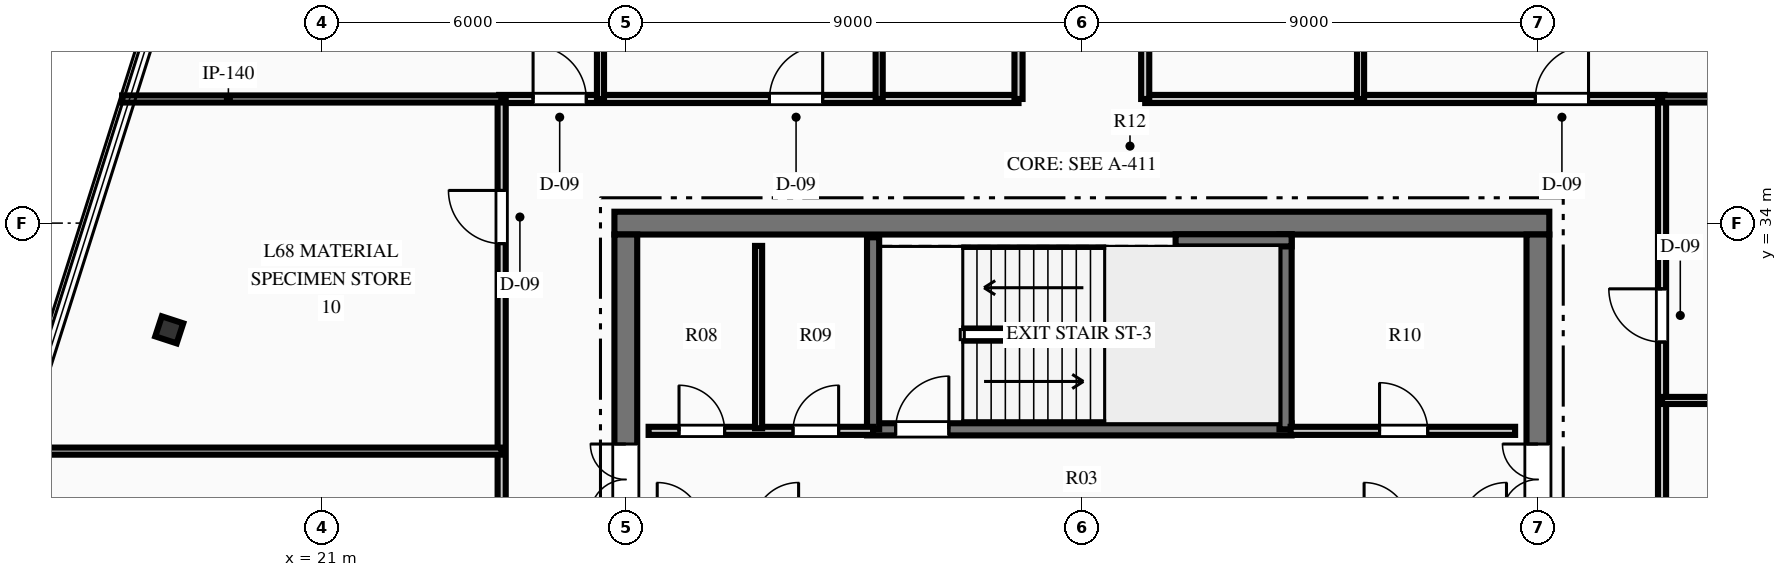
"""IFC4 building model, lengths in metres.
Left out: names, types, materials, properties, quantities, classifications, styles, units other than length and angle.
Written with IfcOpenShell. Run it as: python <this file> out.ifc"""

import sys

from ifc_helpers import new_model, si_unit, direction, frame, frame_2d, origin, origin_2d, place, context, subcontext, project, spatial, rectangle, i_section, extrude, element, fill, save


model = new_model("IFC4")
c1 = context("Model", 3, precision=1e-05, world=origin(), true_north=direction((0.0, 1.0)))
c2 = subcontext(c1, "Body", "Model", "MODEL_VIEW")
j1 = project(units=[si_unit("LENGTHUNIT", "METRE"), si_unit("PLANEANGLEUNIT", "RADIAN")], contexts=[c1])
p1 = place(None, origin())
s1 = spatial("IfcSite", under=j1, at=p1, CompositionType="ELEMENT")
p2 = place(p1, origin())
s2 = spatial("IfcBuilding", under=s1, at=p2, CompositionType="ELEMENT")
p3 = place(p2, frame((0.0, 0.0, 271.2)))
s3 = spatial("IfcBuildingStorey", under=s2, at=p3, CompositionType="ELEMENT", Elevation=271.2)
p4 = place(p3, frame((26.775, 34.0, 0.0), z_axis=(0.0, 0.0, 1.0), x_axis=(1.0, 0.0, 0.0)))
e1 = element("IfcWall", 1, at=p4, inside=s3, PredefinedType="SHEAR", context=c2, shape_type="SweptSolid", body=[
    extrude(rectangle(XDim=18.45, YDim=0.45, at=frame_2d((9.225, 0.0))), origin(), (0.0, 0.0, 1.0), 3.75),
])
p5 = place(p3, frame((27.0, 18.225, 0.0), z_axis=(0.0, 0.0, 1.0), x_axis=(0.0, 1.0, 0.0)))
e2 = element("IfcWall", 2, at=p5, inside=s3, PredefinedType="SHEAR", context=c2, shape_type="SweptSolid", body=[
    extrude(rectangle(XDim=15.55, YDim=0.45, at=frame_2d((7.775, 0.0))), origin(), (0.0, 0.0, 1.0), 3.75),
])
p6 = place(p5, frame((10.015, 0.0, 0.0)))
e3 = element("IfcOpeningElement", 3, at=p6, cuts=e2, PredefinedType="OPENING", context=c2, shape_type="SweptSolid", body=[
    extrude(rectangle(XDim=1.4, YDim=2.2, at=frame_2d((0.7, 1.1))), frame((0.0, 0.235, 0.0), z_axis=(0.0, -1.0, 0.0), x_axis=(1.0, 0.0, 0.0)), (0.0, 0.0, 1.0), 0.47),
])
p7 = place(p3, frame((45.0, 18.225, 0.0), z_axis=(0.0, 0.0, 1.0), x_axis=(0.0, 1.0, 0.0)))
e4 = element("IfcWall", 4, at=p7, inside=s3, PredefinedType="SHEAR", context=c2, shape_type="SweptSolid", body=[
    extrude(rectangle(XDim=15.55, YDim=0.45, at=frame_2d((7.775, 0.0))), origin(), (0.0, 0.0, 1.0), 3.75),
])
p8 = place(p7, frame((10.015, 0.0, 0.0)))
e5 = element("IfcOpeningElement", 5, at=p8, cuts=e4, PredefinedType="OPENING", context=c2, shape_type="SweptSolid", body=[
    extrude(rectangle(XDim=1.4, YDim=2.2, at=frame_2d((0.7, 1.1))), frame((0.0, 0.235, 0.0), z_axis=(0.0, -1.0, 0.0), x_axis=(1.0, 0.0, 0.0)), (0.0, 0.0, 1.0), 0.47),
])
p9 = place(p3, frame((31.76, 29.93, 0.0), z_axis=(0.0, 0.0, 1.0), x_axis=(1.0, 0.0, 0.0)))
e6 = element("IfcWall", 6, at=p9, inside=s3, PredefinedType="SHEAR", context=c2, shape_type="SweptSolid", body=[
    extrude(rectangle(XDim=8.38, YDim=0.24, at=frame_2d((4.19, 0.0))), origin(), (0.0, 0.0, 1.0), 3.75),
])
p10 = place(p9, frame((0.565, 0.0, 0.0)))
e7 = element("IfcOpeningElement", 7, at=p10, cuts=e6, PredefinedType="OPENING", context=c2, shape_type="SweptSolid", body=[
    extrude(rectangle(XDim=1.05, YDim=2.15, at=frame_2d((0.525, 1.075))), frame((0.0, 0.13, 0.0), z_axis=(0.0, -1.0, 0.0), x_axis=(1.0, 0.0, 0.0)), (0.0, 0.0, 1.0), 0.26),
])
p11 = place(p3, frame((31.88, 29.93, 0.0), z_axis=(0.0, 0.0, 1.0), x_axis=(0.0, 1.0, 0.0)))
e8 = element("IfcWall", 8, at=p11, inside=s3, PredefinedType="SHEAR", context=c2, shape_type="SweptSolid", body=[
    extrude(rectangle(XDim=3.79, YDim=0.24, at=frame_2d((1.895, 0.0))), origin(), (0.0, 0.0, 1.0), 3.75),
])
p12 = place(p3, frame((40.02, 29.93, 0.0), z_axis=(0.0, 0.0, 1.0), x_axis=(0.0, 1.0, 0.0)))
e9 = element("IfcWall", 9, at=p12, inside=s3, PredefinedType="SHEAR", context=c2, shape_type="SweptSolid", body=[
    extrude(rectangle(XDim=3.85, YDim=0.24, at=frame_2d((1.925, 0.0))), origin(), (0.0, 0.0, 1.0), 3.75),
])
p13 = place(p3, frame((37.85, 33.66, 0.0), z_axis=(0.0, 0.0, 1.0), x_axis=(1.0, 0.0, 0.0)))
e10 = element("IfcWall", 10, at=p13, inside=s3, PredefinedType="SHEAR", context=c2, shape_type="SweptSolid", body=[
    extrude(rectangle(XDim=2.29, YDim=0.24, at=frame_2d((1.145, 0.0))), origin(), (0.0, 0.0, 1.0), 3.75),
])
p14 = place(p3, frame((17.99, 31.894, 0.0), z_axis=(0.0, 0.0, 1.0), x_axis=(0.311008203279, 0.950407227189, 0.0)))
e11 = element("IfcColumn", 11, at=p14, inside=s3, PredefinedType="COLUMN", context=c2, shape_type="SweptSolid", body=[
    extrude(i_section(OverallWidth=0.416, OverallDepth=0.445, WebThickness=0.039, FlangeThickness=0.063, at=origin_2d()), origin(), (0.0, 0.0, 1.0), 3.75),
])
p15 = place(p3, frame((27.45, 29.9, 0.0), z_axis=(0.0, 0.0, 1.0), x_axis=(1.0, 0.0, 0.0)))
e12 = element("IfcWall", 12, at=p15, inside=s3, PredefinedType="PARTITIONING", context=c2, shape_type="SweptSolid", body=[
    extrude(rectangle(XDim=4.43, YDim=0.16, at=frame_2d((2.215, 0.0))), origin(), (0.0, 0.0, 1.0), 3.48),
])
p16 = place(p15, frame((0.6, 0.0, 0.0)))
e13 = element("IfcOpeningElement", 13, at=p16, cuts=e12, PredefinedType="OPENING", context=c2, shape_type="SweptSolid", body=[
    extrude(rectangle(XDim=0.9, YDim=2.15, at=frame_2d((0.45, 1.075))), frame((0.0, 0.09, 0.0), z_axis=(0.0, -1.0, 0.0), x_axis=(1.0, 0.0, 0.0)), (0.0, 0.0, 1.0), 0.18),
])
p17 = place(p15, frame((2.85, 0.0, 0.0)))
e14 = element("IfcOpeningElement", 14, at=p17, cuts=e12, PredefinedType="OPENING", context=c2, shape_type="SweptSolid", body=[
    extrude(rectangle(XDim=0.9, YDim=2.15, at=frame_2d((0.45, 1.075))), frame((0.0, 0.09, 0.0), z_axis=(0.0, -1.0, 0.0), x_axis=(1.0, 0.0, 0.0)), (0.0, 0.0, 1.0), 0.18),
])
p18 = place(p3, frame((29.62, 29.95, 0.0), z_axis=(0.0, 0.0, 1.0), x_axis=(0.0, 1.0, 0.0)))
e15 = element("IfcWall", 15, at=p18, inside=s3, PredefinedType="PARTITIONING", context=c2, shape_type="SweptSolid", body=[
    extrude(rectangle(XDim=3.6, YDim=0.14, at=frame_2d((1.8, 0.0))), origin(), (0.0, 0.0, 1.0), 3.48),
])
p19 = place(p3, frame((40.12, 29.9, 0.0), z_axis=(0.0, 0.0, 1.0), x_axis=(1.0, 0.0, 0.0)))
e16 = element("IfcWall", 16, at=p19, inside=s3, PredefinedType="PARTITIONING", context=c2, shape_type="SweptSolid", body=[
    extrude(rectangle(XDim=4.43, YDim=0.16, at=frame_2d((2.215, 0.0))), origin(), (0.0, 0.0, 1.0), 3.48),
])
p20 = place(p19, frame((1.755, 0.0, 0.0)))
e17 = element("IfcOpeningElement", 17, at=p20, cuts=e16, PredefinedType="OPENING", context=c2, shape_type="SweptSolid", body=[
    extrude(rectangle(XDim=0.95, YDim=2.15, at=frame_2d((0.475, 1.075))), frame((0.0, 0.09, 0.0), z_axis=(0.0, -1.0, 0.0), x_axis=(1.0, 0.0, 0.0)), (0.0, 0.0, 1.0), 0.18),
])
p21 = place(p3, frame((24.5, 36.45, 0.0), z_axis=(0.0, 0.0, 1.0), x_axis=(1.0, 0.0, 0.0)))
e18 = element("IfcWall", 18, at=p21, inside=s3, PredefinedType="PARTITIONING", context=c2, shape_type="SweptSolid", body=[
    extrude(rectangle(XDim=10.25, YDim=0.16, at=frame_2d((5.125, 0.0))), origin(), (0.0, 0.0, 1.0), 3.48),
])
p22 = place(p21, frame((0.67, 0.0, 0.0)))
e19 = element("IfcOpeningElement", 19, at=p22, cuts=e18, PredefinedType="OPENING", context=c2, shape_type="SweptSolid", body=[
    extrude(rectangle(XDim=1.05, YDim=2.15, at=frame_2d((0.525, 1.075))), frame((0.0, 0.09, 0.0), z_axis=(0.0, -1.0, 0.0), x_axis=(1.0, 0.0, 0.0)), (0.0, 0.0, 1.0), 0.18),
])
p23 = place(p21, frame((5.335, 0.0, 0.0)))
e20 = element("IfcOpeningElement", 20, at=p23, cuts=e18, PredefinedType="OPENING", context=c2, shape_type="SweptSolid", body=[
    extrude(rectangle(XDim=1.05, YDim=2.15, at=frame_2d((0.525, 1.075))), frame((0.0, 0.09, 0.0), z_axis=(0.0, -1.0, 0.0), x_axis=(1.0, 0.0, 0.0)), (0.0, 0.0, 1.0), 0.18),
])
p24 = place(p3, frame((37.25, 36.45, 0.0), z_axis=(0.0, 0.0, 1.0), x_axis=(1.0, 0.0, 0.0)))
e21 = element("IfcWall", 21, at=p24, inside=s3, PredefinedType="PARTITIONING", context=c2, shape_type="SweptSolid", body=[
    extrude(rectangle(XDim=10.25, YDim=0.16, at=frame_2d((5.125, 0.0))), origin(), (0.0, 0.0, 1.0), 3.48),
])
p25 = place(p24, frame((7.699, 0.0, 0.0)))
e22 = element("IfcOpeningElement", 22, at=p25, cuts=e21, PredefinedType="OPENING", context=c2, shape_type="SweptSolid", body=[
    extrude(rectangle(XDim=1.05, YDim=2.15, at=frame_2d((0.525, 1.075))), frame((0.0, 0.09, 0.0), z_axis=(0.0, -1.0, 0.0), x_axis=(1.0, 0.0, 0.0)), (0.0, 0.0, 1.0), 0.18),
])
p26 = place(p3, frame((24.55, 27.25, 0.0), z_axis=(0.0, 0.0, 1.0), x_axis=(0.0, 1.0, 0.0)))
e23 = element("IfcWall", 23, at=p26, inside=s3, PredefinedType="PARTITIONING", context=c2, shape_type="SweptSolid", body=[
    extrude(rectangle(XDim=9.2, YDim=0.16, at=frame_2d((4.6, 0.0))), origin(), (0.0, 0.0, 1.0), 3.48),
])
p27 = place(p26, frame((6.345, 0.0, 0.0)))
e24 = element("IfcOpeningElement", 24, at=p27, cuts=e23, PredefinedType="OPENING", context=c2, shape_type="SweptSolid", body=[
    extrude(rectangle(XDim=1.05, YDim=2.15, at=frame_2d((0.525, 1.075))), frame((0.0, 0.09, 0.0), z_axis=(0.0, -1.0, 0.0), x_axis=(1.0, 0.0, 0.0)), (0.0, 0.0, 1.0), 0.18),
])
p28 = place(p3, frame((47.45, 27.25, 0.0), z_axis=(0.0, 0.0, 1.0), x_axis=(0.0, 1.0, 0.0)))
e25 = element("IfcWall", 25, at=p28, inside=s3, PredefinedType="PARTITIONING", context=c2, shape_type="SweptSolid", body=[
    extrude(rectangle(XDim=9.2, YDim=0.16, at=frame_2d((4.6, 0.0))), origin(), (0.0, 0.0, 1.0), 3.48),
])
p29 = place(p28, frame((4.403, 0.0, 0.0)))
e26 = element("IfcOpeningElement", 26, at=p29, cuts=e25, PredefinedType="OPENING", context=c2, shape_type="SweptSolid", body=[
    extrude(rectangle(XDim=1.05, YDim=2.15, at=frame_2d((0.525, 1.075))), frame((0.0, 0.09, 0.0), z_axis=(0.0, -1.0, 0.0), x_axis=(1.0, 0.0, 0.0)), (0.0, 0.0, 1.0), 0.18),
])
p30 = place(p3, frame((34.75, 36.45, 0.0), z_axis=(0.0, 0.0, 1.0), x_axis=(0.0, 1.0, 0.0)))
e27 = element("IfcWall", 27, at=p30, inside=s3, PredefinedType="PARTITIONING", context=c2, shape_type="SweptSolid", body=[
    extrude(rectangle(XDim=6.45, YDim=0.16, at=frame_2d((3.225, 0.0))), origin(), (0.0, 0.0, 1.0), 3.48),
])
p31 = place(p30, frame((1.539, 0.0, 0.0)))
e28 = element("IfcOpeningElement", 28, at=p31, cuts=e27, PredefinedType="OPENING", context=c2, shape_type="SweptSolid", body=[
    extrude(rectangle(XDim=1.05, YDim=2.15, at=frame_2d((0.525, 1.075))), frame((0.0, 0.09, 0.0), z_axis=(0.0, -1.0, 0.0), x_axis=(1.0, 0.0, 0.0)), (0.0, 0.0, 1.0), 0.18),
])
p32 = place(p3, frame((37.25, 36.45, 0.0), z_axis=(0.0, 0.0, 1.0), x_axis=(0.0, 1.0, 0.0)))
e29 = element("IfcWall", 29, at=p32, inside=s3, PredefinedType="PARTITIONING", context=c2, shape_type="SweptSolid", body=[
    extrude(rectangle(XDim=6.45, YDim=0.16, at=frame_2d((3.225, 0.0))), origin(), (0.0, 0.0, 1.0), 3.48),
])
p33 = place(p3, frame((17.06, 36.45, 0.0), z_axis=(0.0, 0.0, 1.0), x_axis=(1.0, 0.0, 0.0)))
e30 = element("IfcWall", 30, at=p33, inside=s3, PredefinedType="PARTITIONING", context=c2, shape_type="SweptSolid", body=[
    extrude(rectangle(XDim=7.49, YDim=0.14, at=frame_2d((3.745, 0.0))), origin(), (0.0, 0.0, 1.0), 3.48),
])
p34 = place(p3, frame((47.45, 36.45, 0.0), z_axis=(0.0, 0.0, 1.0), x_axis=(1.0, 0.0, 0.0)))
e31 = element("IfcWall", 31, at=p34, inside=s3, PredefinedType="PARTITIONING", context=c2, shape_type="SweptSolid", body=[
    extrude(rectangle(XDim=15.752, YDim=0.14, at=frame_2d((7.876, 0.0))), origin(), (0.0, 0.0, 1.0), 2.858),
])
p35 = place(p3, frame((26.5, 36.45, 0.0), z_axis=(0.0, 0.0, 1.0), x_axis=(0.0, 1.0, 0.0)))
e32 = element("IfcWall", 32, at=p35, inside=s3, PredefinedType="PARTITIONING", context=c2, shape_type="SweptSolid", body=[
    extrude(rectangle(XDim=16.688, YDim=0.14, at=frame_2d((8.344, 0.0))), origin(), (0.0, 0.0, 1.0), 2.858),
])
p36 = place(p3, frame((32.0, 36.45, 0.0), z_axis=(0.0, 0.0, 1.0), x_axis=(0.0, 1.0, 0.0)))
e33 = element("IfcWall", 33, at=p36, inside=s3, PredefinedType="PARTITIONING", context=c2, shape_type="SweptSolid", body=[
    extrude(rectangle(XDim=14.948, YDim=0.14, at=frame_2d((7.474, 0.0))), origin(), (0.0, 0.0, 1.0), 2.858),
])
p37 = place(p3, frame((41.5, 36.45, 0.0), z_axis=(0.0, 0.0, 1.0), x_axis=(0.0, 1.0, 0.0)))
e34 = element("IfcWall", 34, at=p37, inside=s3, PredefinedType="PARTITIONING", context=c2, shape_type="SweptSolid", body=[
    extrude(rectangle(XDim=11.944, YDim=0.14, at=frame_2d((5.972, 0.0))), origin(), (0.0, 0.0, 1.0), 3.48),
])
p38 = place(p3, frame((14.862, 29.5, 0.0), z_axis=(0.0, 0.0, 1.0), x_axis=(1.0, 0.0, 0.0)))
e35 = element("IfcWall", 35, at=p38, inside=s3, PredefinedType="PARTITIONING", context=c2, shape_type="SweptSolid", body=[
    extrude(rectangle(XDim=9.688, YDim=0.14, at=frame_2d((4.844, 0.0))), origin(), (0.0, 0.0, 1.0), 3.48),
])
p39 = place(p3, frame((47.45, 30.5, 0.0), z_axis=(0.0, 0.0, 1.0), x_axis=(1.0, 0.0, 0.0)))
e36 = element("IfcWall", 36, at=p39, inside=s3, PredefinedType="PARTITIONING", context=c2, shape_type="SweptSolid", body=[
    extrude(rectangle(XDim=13.871, YDim=0.14, at=frame_2d((6.935, 0.0))), origin(), (0.0, 0.0, 1.0), 3.48),
])
p40 = place(p16, origin())
e37 = element("IfcDoor", 37, at=p40, inside=s3, OperationType="SINGLE_SWING_LEFT", PredefinedType="DOOR", context=c2, shape_type="SweptSolid", body=[
    extrude(rectangle(XDim=0.9, YDim=2.15, at=frame_2d((0.45, 1.075))), frame((0.0, 0.025, 0.0), z_axis=(0.0, -1.0, 0.0), x_axis=(1.0, 0.0, 0.0)), (0.0, 0.0, 1.0), 0.05),
])
fill(e13, e37)
p41 = place(p17, origin())
e38 = element("IfcDoor", 38, at=p41, inside=s3, OperationType="SINGLE_SWING_RIGHT", PredefinedType="DOOR", context=c2, shape_type="SweptSolid", body=[
    extrude(rectangle(XDim=0.9, YDim=2.15, at=frame_2d((0.45, 1.075))), frame((0.0, 0.025, 0.0), z_axis=(0.0, -1.0, 0.0), x_axis=(1.0, 0.0, 0.0)), (0.0, 0.0, 1.0), 0.05),
])
fill(e14, e38)
p42 = place(p20, origin())
e39 = element("IfcDoor", 39, at=p42, inside=s3, OperationType="SINGLE_SWING_LEFT", PredefinedType="DOOR", context=c2, shape_type="SweptSolid", body=[
    extrude(rectangle(XDim=0.95, YDim=2.15, at=frame_2d((0.475, 1.075))), frame((0.0, 0.025, 0.0), z_axis=(0.0, -1.0, 0.0), x_axis=(1.0, 0.0, 0.0)), (0.0, 0.0, 1.0), 0.05),
])
fill(e17, e39)
p43 = place(p10, origin())
e40 = element("IfcDoor", 40, at=p43, inside=s3, OperationType="SINGLE_SWING_RIGHT", PredefinedType="DOOR", context=c2, shape_type="SweptSolid", body=[
    extrude(rectangle(XDim=1.05, YDim=2.15, at=frame_2d((0.525, 1.075))), frame((0.0, 0.025, 0.0), z_axis=(0.0, -1.0, 0.0), x_axis=(1.0, 0.0, 0.0)), (0.0, 0.0, 1.0), 0.05),
])
fill(e7, e40)
p44 = place(p6, origin())
e41 = element("IfcDoor", 41, at=p44, inside=s3, OperationType="DOUBLE_DOOR_SINGLE_SWING", PredefinedType="DOOR", context=c2, shape_type="SweptSolid", body=[
    extrude(rectangle(XDim=1.4, YDim=2.2, at=frame_2d((0.7, 1.1))), frame((0.0, 0.025, 0.0), z_axis=(0.0, -1.0, 0.0), x_axis=(1.0, 0.0, 0.0)), (0.0, 0.0, 1.0), 0.05),
])
fill(e3, e41)
p45 = place(p8, origin())
e42 = element("IfcDoor", 42, at=p45, inside=s3, OperationType="DOUBLE_DOOR_SINGLE_SWING", PredefinedType="DOOR", context=c2, shape_type="SweptSolid", body=[
    extrude(rectangle(XDim=1.4, YDim=2.2, at=frame_2d((0.7, 1.1))), frame((0.0, 0.025, 0.0), z_axis=(0.0, -1.0, 0.0), x_axis=(1.0, 0.0, 0.0)), (0.0, 0.0, 1.0), 0.05),
])
fill(e5, e42)
p46 = place(p22, origin())
e43 = element("IfcDoor", 43, at=p46, inside=s3, OperationType="SINGLE_SWING_LEFT", PredefinedType="DOOR", context=c2, shape_type="SweptSolid", body=[
    extrude(rectangle(XDim=1.05, YDim=2.15, at=frame_2d((0.525, 1.075))), frame((0.0, 0.025, 0.0), z_axis=(0.0, -1.0, 0.0), x_axis=(1.0, 0.0, 0.0)), (0.0, 0.0, 1.0), 0.05),
])
fill(e19, e43)
p47 = place(p23, origin())
e44 = element("IfcDoor", 44, at=p47, inside=s3, OperationType="SINGLE_SWING_RIGHT", PredefinedType="DOOR", context=c2, shape_type="SweptSolid", body=[
    extrude(rectangle(XDim=1.05, YDim=2.15, at=frame_2d((0.525, 1.075))), frame((0.0, 0.025, 0.0), z_axis=(0.0, -1.0, 0.0), x_axis=(1.0, 0.0, 0.0)), (0.0, 0.0, 1.0), 0.05),
])
fill(e20, e44)
p48 = place(p25, origin())
e45 = element("IfcDoor", 45, at=p48, inside=s3, OperationType="SINGLE_SWING_RIGHT", PredefinedType="DOOR", context=c2, shape_type="SweptSolid", body=[
    extrude(rectangle(XDim=1.05, YDim=2.15, at=frame_2d((0.525, 1.075))), frame((0.0, 0.025, 0.0), z_axis=(0.0, -1.0, 0.0), x_axis=(1.0, 0.0, 0.0)), (0.0, 0.0, 1.0), 0.05),
])
fill(e22, e45)
p49 = place(p27, origin())
e46 = element("IfcDoor", 46, at=p49, inside=s3, OperationType="SINGLE_SWING_RIGHT", PredefinedType="DOOR", context=c2, shape_type="SweptSolid", body=[
    extrude(rectangle(XDim=1.05, YDim=2.15, at=frame_2d((0.525, 1.075))), frame((0.0, 0.025, 0.0), z_axis=(0.0, -1.0, 0.0), x_axis=(1.0, 0.0, 0.0)), (0.0, 0.0, 1.0), 0.05),
])
fill(e24, e46)
p50 = place(p29, origin())
e47 = element("IfcDoor", 47, at=p50, inside=s3, OperationType="SINGLE_SWING_RIGHT", PredefinedType="DOOR", context=c2, shape_type="SweptSolid", body=[
    extrude(rectangle(XDim=1.05, YDim=2.15, at=frame_2d((0.525, 1.075))), frame((0.0, 0.025, 0.0), z_axis=(0.0, -1.0, 0.0), x_axis=(1.0, 0.0, 0.0)), (0.0, 0.0, 1.0), 0.05),
])
fill(e26, e47)
save(model, sys.argv[1])
